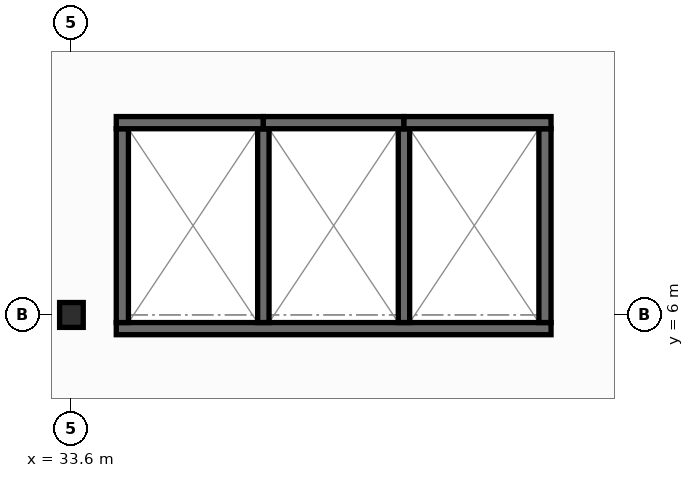
"""IFC4 building model, lengths in metres.
Left out: names, types, materials, properties, quantities, classifications, styles, units other than length and angle.
Written with IfcOpenShell. Run it as: python <this file> out.ifc"""

import sys

from ifc_helpers import new_model, si_unit, direction, frame, frame_2d, origin, origin_2d, place, context, subcontext, project, spatial, rectangle, i_section, extrude, element, save


model = new_model("IFC4")
c1 = context("Model", 3, precision=1e-05, world=origin(), true_north=direction((0.0, 1.0)))
c2 = subcontext(c1, "Body", "Model", "MODEL_VIEW")
j1 = project(units=[si_unit("LENGTHUNIT", "METRE"), si_unit("PLANEANGLEUNIT", "RADIAN")], contexts=[c1])
p1 = place(None, origin())
s1 = spatial("IfcSite", under=j1, at=p1, CompositionType="ELEMENT")
p2 = place(p1, origin())
s2 = spatial("IfcBuilding", under=s1, at=p2, CompositionType="ELEMENT")
p3 = place(p2, frame((0.0, 0.0, 89.65)))
s3 = spatial("IfcBuildingStorey", under=s2, at=p3, CompositionType="ELEMENT", Elevation=89.65)
p4 = place(p3, frame((33.6, 6.0, 0.0), z_axis=(0.0, 0.0, 1.0), x_axis=(1.0, 0.0, 0.0)))
e1 = element("IfcColumn", 1, at=p4, inside=s3, PredefinedType="COLUMN", context=c2, shape_type="SweptSolid", body=[
    extrude(i_section(OverallWidth=0.311, OverallDepth=0.327, WebThickness=0.016, FlangeThickness=0.025, FilletRadius=0.017, at=origin_2d()), origin(), (0.0, 0.0, 1.0), 3.95),
])
p5 = place(p3, frame((34.19, 5.82, 0.0), z_axis=(0.0, 0.0, 1.0), x_axis=(1.0, 0.0, 0.0)))
e2 = element("IfcWall", 2, at=p5, inside=s3, PredefinedType="SHEAR", context=c2, shape_type="SweptSolid", body=[
    extrude(rectangle(XDim=5.72, YDim=0.16, at=frame_2d((2.86, 0.0))), origin(), (0.0, 0.0, 1.0), 3.71),
])
for number, where, z_axis, x_axis in (
    (3, (34.27, 5.9, 0.0), (0.0, 0.0, 1.0), (0.0, 1.0, 0.0)),
    (4, (39.83, 5.9, 0.0), (0.0, 0.0, 1.0), (0.0, 1.0, 0.0)),
):
    element("IfcWall", number, at=place(p3, frame(where, z_axis=z_axis, x_axis=x_axis)), inside=s3, PredefinedType="SHEAR", context=c2, shape_type="SweptSolid", body=[
        extrude(rectangle(XDim=2.55, YDim=0.16, at=frame_2d((1.275, 0.0))), origin(), (0.0, 0.0, 1.0), 3.71),
    ])
for number, where, z_axis, x_axis in (
    (5, (36.125, 5.9, 0.0), (0.0, 0.0, 1.0), (0.0, 1.0, 0.0)),
    (6, (37.975, 5.9, 0.0), (0.0, 0.0, 1.0), (0.0, 1.0, 0.0)),
):
    element("IfcWall", number, at=place(p3, frame(where, z_axis=z_axis, x_axis=x_axis)), inside=s3, PredefinedType="SHEAR", context=c2, shape_type="SweptSolid", body=[
        extrude(rectangle(XDim=2.55, YDim=0.15, at=frame_2d((1.275, 0.0))), origin(), (0.0, 0.0, 1.0), 3.71),
    ])
p6 = place(p3, frame((34.19, 8.53, 0.0), z_axis=(0.0, 0.0, 1.0), x_axis=(1.0, 0.0, 0.0)))
e7 = element("IfcWall", 7, at=p6, inside=s3, PredefinedType="SHEAR", context=c2, shape_type="SweptSolid", body=[
    extrude(rectangle(XDim=1.935, YDim=0.16, at=frame_2d((0.968, 0.0))), origin(), (0.0, 0.0, 1.0), 3.71),
])
p7 = place(p3, frame((36.125, 8.53, 0.0), z_axis=(0.0, 0.0, 1.0), x_axis=(1.0, 0.0, 0.0)))
e8 = element("IfcWall", 8, at=p7, inside=s3, PredefinedType="SHEAR", context=c2, shape_type="SweptSolid", body=[
    extrude(rectangle(XDim=1.85, YDim=0.16, at=frame_2d((0.925, 0.0))), origin(), (0.0, 0.0, 1.0), 3.71),
])
p8 = place(p3, frame((37.975, 8.53, 0.0), z_axis=(0.0, 0.0, 1.0), x_axis=(1.0, 0.0, 0.0)))
e9 = element("IfcWall", 9, at=p8, inside=s3, PredefinedType="SHEAR", context=c2, shape_type="SweptSolid", body=[
    extrude(rectangle(XDim=1.935, YDim=0.16, at=frame_2d((0.967, 0.0))), origin(), (0.0, 0.0, 1.0), 3.71),
])
save(model, sys.argv[1])
